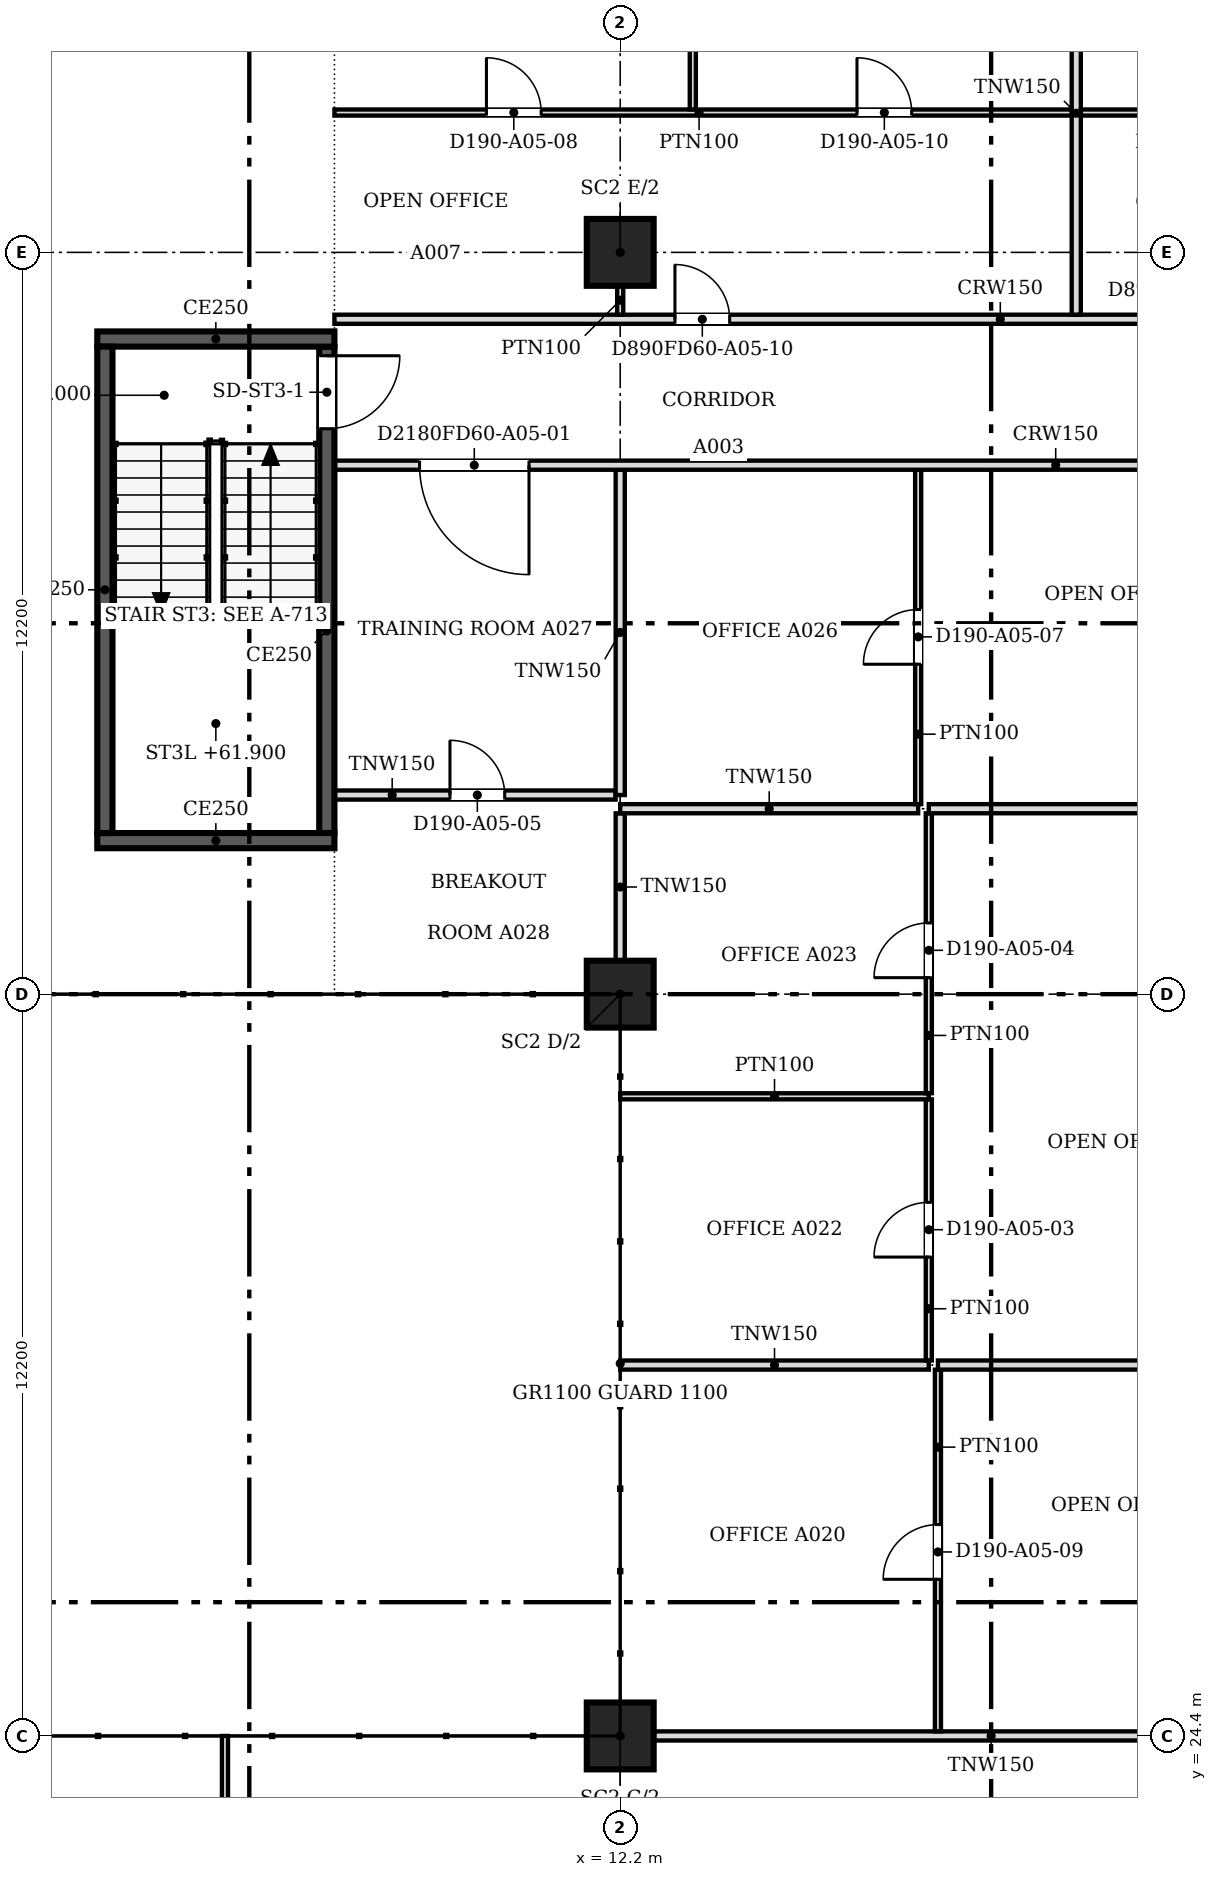
"""IFC4 building model, lengths in metres.
Left out: names, types, materials, properties, quantities, classifications, styles, units other than length and angle.
Written with IfcOpenShell. Run it as: python <this file> out.ifc"""

import sys

from ifc_helpers import new_model, si_unit, direction, frame, frame_2d, origin, origin_2d, place, context, subcontext, project, spatial, polyline, rectangle, outline, extrude, faceted_brep, source, transform, mapped, element, fill, save


model = new_model("IFC4")
c1 = context("Model", 3, precision=1e-05, world=origin(), true_north=direction((0.0, 1.0)))
c2 = subcontext(c1, "Body", "Model", "MODEL_VIEW")
j1 = project(units=[si_unit("LENGTHUNIT", "METRE"), si_unit("PLANEANGLEUNIT", "RADIAN")], contexts=[c1])
p1 = place(None, origin())
s1 = spatial("IfcSite", under=j1, at=p1, CompositionType="ELEMENT")
p2 = place(p1, origin())
s2 = spatial("IfcBuilding", under=s1, at=p2, CompositionType="ELEMENT")
p3 = place(p2, frame((0.0, 0.0, 60.0)))
s3 = spatial("IfcBuildingStorey", under=s2, at=p3, CompositionType="ELEMENT", Elevation=60.0)
for number, where, z_axis, x_axis in (
    (1, (12.2, 24.4, 0.0), (0.0, 0.0, 1.0), (1.0, 0.0, 0.0)),
    (2, (12.2, 36.6, 0.0), (0.0, 0.0, 1.0), (1.0, 0.0, 0.0)),
    (3, (12.2, 48.8, 0.0), (0.0, 0.0, 1.0), (1.0, 0.0, 0.0)),
):
    element("IfcColumn", number, at=place(p3, frame(where, z_axis=z_axis, x_axis=x_axis)), inside=s3, PredefinedType="COLUMN", context=c2, shape_type="SweptSolid", body=[
        extrude(rectangle(XDim=1.1, YDim=1.1, at=origin_2d()), origin(), (0.0, 0.0, 1.0), 3.5),
    ])
m1 = source(origin(), c2, "Body", "Brep", [
    faceted_brep([(0.053, -0.25, 0.0), (2.997, -0.25, 3.8), (0.053, -0.25, 7.6), (0.0, -0.25, 7.532), (0.0, -0.25, 0.068), (0.106, 0.25, 7.532), (2.944, 0.25, 3.868), (2.944, 0.25, 3.732), (0.106, 0.25, 0.068), (2.997, 0.0, 3.8), (0.053, 0.0, 0.0), (0.053, 0.0, 7.6)], [[[0, 1, 2, 3, 4]], [[5, 6, 7, 8]], [[8, 7, 9, 1, 0, 10]], [[6, 5, 11, 2, 1, 9]], [[3, 2, 11]], [[10, 0, 4]], [[8, 10, 4, 3, 11, 5]], [[9, 7, 6]]]),
])
p4 = place(p3, frame((3.431, 53.625, -3.8), z_axis=(0.0, 0.0, 1.0), x_axis=(-0.707106781187, -0.707106781187, 0.0)))
e4 = element("IfcWall", 4, at=p4, inside=s3, PredefinedType="SOLIDWALL", context=c2, shape_type="MappedRepresentation", body=[
    mapped(m1, transform((0.0, 0.0, 0.0), scale=1.0)),
])
m2 = source(origin(), c2, "Body", "SweptSolid", [
    extrude(outline(polyline([(0.253, 0.666), (2.681, 3.8), (0.253, 6.934), (0.253, 0.666)])), frame((0.0, 0.26, 0.0), z_axis=(0.0, -1.0, 0.0), x_axis=(1.0, 0.0, 0.0)), (0.0, 0.0, 1.0), 0.52),
])
p5 = place(p4, origin())
e5 = element("IfcOpeningElement", 5, at=p5, cuts=e4, PredefinedType="OPENING", context=c2, shape_type="MappedRepresentation", body=[
    mapped(m2, transform((0.0, 0.0, 0.0), scale=1.0)),
])
m3 = source(origin(), c2, "Body", "Brep", [
    faceted_brep([(2.944, -0.25, 0.0), (2.997, -0.25, 0.068), (2.997, -0.25, 3.8), (0.0, -0.25, 3.8), (0.053, 0.25, 3.8), (2.891, 0.25, 3.8), (2.891, 0.25, 0.068), (0.053, 0.25, 3.732), (2.944, 0.0, 0.0), (0.0, 0.0, 3.8)], [[[0, 1, 2, 3]], [[4, 5, 6, 7]], [[1, 0, 8]], [[5, 4, 9, 3, 2]], [[7, 6, 8, 0, 3, 9]], [[7, 9, 4]], [[1, 8, 6, 5, 2]]]),
])
p6 = place(p3, frame((3.394, 53.588, 0.0), z_axis=(0.0, 0.0, 1.0), x_axis=(-0.707106781187, -0.707106781187, 0.0)))
e6 = element("IfcWall", 6, at=p6, inside=s3, PredefinedType="SOLIDWALL", context=c2, shape_type="MappedRepresentation", body=[
    mapped(m3, transform((0.0, 0.0, 0.0), scale=1.0)),
])
m4 = source(origin(), c2, "Body", "SweptSolid", [
    extrude(outline(polyline([(2.744, 3.55), (0.51, 3.55), (2.744, 0.666), (2.744, 3.55)])), frame((0.0, 0.26, 0.0), z_axis=(0.0, -1.0, 0.0), x_axis=(1.0, 0.0, 0.0)), (0.0, 0.0, 1.0), 0.52),
])
p7 = place(p6, origin())
e7 = element("IfcOpeningElement", 7, at=p7, cuts=e6, PredefinedType="OPENING", context=c2, shape_type="MappedRepresentation", body=[
    mapped(m4, transform((0.0, 0.0, 0.0), scale=1.0)),
])
p8 = place(p3, frame((7.5, 39.125, 0.0), z_axis=(0.0, 0.0, 1.0), x_axis=(-1.0, 0.0, 0.0)))
e8 = element("IfcWall", 8, at=p8, inside=s3, PredefinedType="SOLIDWALL", context=c2, shape_type="SweptSolid", body=[
    extrude(rectangle(XDim=3.9, YDim=0.25, at=frame_2d((1.95, 0.0))), origin(), (0.0, 0.0, 1.0), 3.8),
])
p9 = place(p3, frame((3.725, 39.25, 0.0), z_axis=(0.0, 0.0, 1.0), x_axis=(0.0, 1.0, 0.0)))
e9 = element("IfcWall", 9, at=p9, inside=s3, PredefinedType="SOLIDWALL", context=c2, shape_type="SweptSolid", body=[
    extrude(rectangle(XDim=8.0, YDim=0.25, at=frame_2d((4.0, 0.0))), origin(), (0.0, 0.0, 1.0), 3.8),
])
p10 = place(p3, frame((3.6, 47.375, 0.0), z_axis=(0.0, 0.0, 1.0), x_axis=(1.0, 0.0, 0.0)))
e10 = element("IfcWall", 10, at=p10, inside=s3, PredefinedType="SOLIDWALL", context=c2, shape_type="SweptSolid", body=[
    extrude(rectangle(XDim=3.9, YDim=0.25, at=frame_2d((1.95, 0.0))), origin(), (0.0, 0.0, 1.0), 3.8),
])
p11 = place(p3, frame((7.375, 47.25, 0.0), z_axis=(0.0, 0.0, 1.0), x_axis=(0.0, -1.0, 0.0)))
e11 = element("IfcWall", 11, at=p11, inside=s3, PredefinedType="SOLIDWALL", context=c2, shape_type="SweptSolid", body=[
    extrude(rectangle(XDim=8.0, YDim=0.25, at=frame_2d((4.0, 0.0))), origin(), (0.0, 0.0, 1.0), 3.8),
])
m5 = source(origin(), c2, "Body", "SweptSolid", [
    extrude(rectangle(XDim=1.2, YDim=2.1, at=frame_2d((0.6, 1.05))), frame((0.0, 0.135, 0.0), z_axis=(0.0, -1.0, 0.0), x_axis=(1.0, 0.0, 0.0)), (0.0, 0.0, 1.0), 0.27),
])
p12 = place(p11, frame((0.15, 0.0, 0.0)))
e12 = element("IfcOpeningElement", 12, at=p12, cuts=e11, PredefinedType="OPENING", context=c2, shape_type="MappedRepresentation", body=[
    mapped(m5, transform((0.0, 0.0, 0.0), scale=1.0)),
])
p13 = place(p3, frame((5.7, 18.99, 0.0), z_axis=(0.0, 0.0, 1.0), x_axis=(0.0, 1.0, 0.0)))
e13 = element("IfcWall", 13, at=p13, inside=s3, PredefinedType="PARTITIONING", context=c2, shape_type="SweptSolid", body=[
    extrude(rectangle(XDim=5.41, YDim=0.1, at=frame_2d((2.705, 0.0))), origin(), (0.0, 0.0, 1.0), 2.888),
])
m6 = source(origin(), c2, "Body", "SweptSolid", [
    extrude(rectangle(XDim=0.9, YDim=2.1, at=frame_2d((0.45, 1.05))), frame((0.0, 0.06, 0.0), z_axis=(0.0, -1.0, 0.0), x_axis=(1.0, 0.0, 0.0)), (0.0, 0.0, 1.0), 0.12),
])
p14 = place(p13, frame((2.3, 0.0, 0.0)))
e14 = element("IfcOpeningElement", 14, at=p14, cuts=e13, PredefinedType="OPENING", context=c2, shape_type="MappedRepresentation", body=[
    mapped(m6, transform((0.0, 0.0, 0.0), scale=1.0)),
])
p15 = place(p3, frame((12.751, 24.4, 0.0), z_axis=(0.0, 0.0, 1.0), x_axis=(1.0, 0.0, 0.0)))
e15 = element("IfcWall", 15, at=p15, inside=s3, PredefinedType="PARTITIONING", context=c2, shape_type="SweptSolid", body=[
    extrude(rectangle(XDim=11.098, YDim=0.15, at=frame_2d((5.549, 0.0))), origin(), (0.0, 0.0, 1.0), 2.888),
])
p16 = place(p3, frame((17.425, 24.476, 0.0), z_axis=(0.0, 0.0, 1.0), x_axis=(0.0, 1.0, 0.0)))
e16 = element("IfcWall", 16, at=p16, inside=s3, PredefinedType="PARTITIONING", context=c2, shape_type="SweptSolid", body=[
    extrude(rectangle(XDim=5.948, YDim=0.1, at=frame_2d((2.974, 0.0))), origin(), (0.0, 0.0, 1.0), 2.888),
])
p17 = place(p16, frame((2.5, 0.0, 0.0)))
e17 = element("IfcOpeningElement", 17, at=p17, cuts=e16, PredefinedType="OPENING", context=c2, shape_type="MappedRepresentation", body=[
    mapped(m6, transform((0.0, 0.0, 0.0), scale=1.0)),
])
p18 = place(p3, frame((12.2, 30.5, 0.0), z_axis=(0.0, 0.0, 1.0), x_axis=(1.0, 0.0, 0.0)))
e18 = element("IfcWall", 18, at=p18, inside=s3, PredefinedType="PARTITIONING", context=c2, shape_type="SweptSolid", body=[
    extrude(rectangle(XDim=5.075, YDim=0.15, at=frame_2d((2.538, 0.0))), origin(), (0.0, 0.0, 1.0), 2.888),
])
p19 = place(p3, frame((17.425, 30.5, 0.0), z_axis=(0.0, 0.0, 1.0), x_axis=(1.0, 0.0, 0.0)))
e19 = element("IfcWall", 19, at=p19, inside=s3, PredefinedType="PARTITIONING", context=c2, shape_type="SweptSolid", body=[
    extrude(rectangle(XDim=10.599, YDim=0.15, at=frame_2d((5.299, 0.0))), origin(), (0.0, 0.0, 1.0), 2.888),
])
p20 = place(p3, frame((17.275, 30.576, 0.0), z_axis=(0.0, 0.0, 1.0), x_axis=(0.0, 1.0, 0.0)))
e20 = element("IfcWall", 20, at=p20, inside=s3, PredefinedType="PARTITIONING", context=c2, shape_type="SweptSolid", body=[
    extrude(rectangle(XDim=4.293, YDim=0.1, at=frame_2d((2.147, 0.0))), origin(), (0.0, 0.0, 1.0), 2.888),
])
p21 = place(p20, frame((1.7, 0.0, 0.0)))
e21 = element("IfcOpeningElement", 21, at=p21, cuts=e20, PredefinedType="OPENING", context=c2, shape_type="MappedRepresentation", body=[
    mapped(m6, transform((0.0, 0.0, 0.0), scale=1.0)),
])
p22 = place(p3, frame((12.2, 34.92, 0.0), z_axis=(0.0, 0.0, 1.0), x_axis=(1.0, 0.0, 0.0)))
e22 = element("IfcWall", 22, at=p22, inside=s3, PredefinedType="PARTITIONING", context=c2, shape_type="SweptSolid", body=[
    extrude(rectangle(XDim=5.075, YDim=0.1, at=frame_2d((2.538, 0.0))), origin(), (0.0, 0.0, 1.0), 2.888),
])
p23 = place(p3, frame((17.275, 34.971, 0.0), z_axis=(0.0, 0.0, 1.0), x_axis=(0.0, 1.0, 0.0)))
e23 = element("IfcWall", 23, at=p23, inside=s3, PredefinedType="PARTITIONING", context=c2, shape_type="SweptSolid", body=[
    extrude(rectangle(XDim=4.603, YDim=0.1, at=frame_2d((2.301, 0.0))), origin(), (0.0, 0.0, 1.0), 2.888),
])
p24 = place(p23, frame((1.9, 0.0, 0.0)))
e24 = element("IfcOpeningElement", 24, at=p24, cuts=e23, PredefinedType="OPENING", context=c2, shape_type="MappedRepresentation", body=[
    mapped(m6, transform((0.0, 0.0, 0.0), scale=1.0)),
])
p25 = place(p3, frame((12.2, 37.151, 0.0), z_axis=(0.0, 0.0, 1.0), x_axis=(0.0, 1.0, 0.0)))
e25 = element("IfcWall", 25, at=p25, inside=s3, PredefinedType="PARTITIONING", context=c2, shape_type="SweptSolid", body=[
    extrude(rectangle(XDim=2.423, YDim=0.15, at=frame_2d((1.211, 0.0))), origin(), (0.0, 0.0, 1.0), 2.888),
])
p26 = place(p3, frame((12.2, 39.65, 0.0), z_axis=(0.0, 0.0, 1.0), x_axis=(1.0, 0.0, 0.0)))
e26 = element("IfcWall", 26, at=p26, inside=s3, PredefinedType="PARTITIONING", context=c2, shape_type="SweptSolid", body=[
    extrude(rectangle(XDim=4.9, YDim=0.15, at=frame_2d((2.45, 0.0))), origin(), (0.0, 0.0, 1.0), 2.888),
])
p27 = place(p3, frame((17.275, 39.65, 0.0), z_axis=(0.0, 0.0, 1.0), x_axis=(1.0, 0.0, 0.0)))
e27 = element("IfcWall", 27, at=p27, inside=s3, PredefinedType="PARTITIONING", context=c2, shape_type="SweptSolid", body=[
    extrude(rectangle(XDim=10.749, YDim=0.15, at=frame_2d((5.375, 0.0))), origin(), (0.0, 0.0, 1.0), 2.888),
])
p28 = place(p3, frame((17.1, 39.726, 0.0), z_axis=(0.0, 0.0, 1.0), x_axis=(0.0, 1.0, 0.0)))
e28 = element("IfcWall", 28, at=p28, inside=s3, PredefinedType="PARTITIONING", context=c2, shape_type="SweptSolid", body=[
    extrude(rectangle(XDim=5.498, YDim=0.1, at=frame_2d((2.749, 0.0))), origin(), (0.0, 0.0, 1.0), 2.888),
])
p29 = place(p28, frame((2.3, 0.0, 0.0)))
e29 = element("IfcOpeningElement", 29, at=p29, cuts=e28, PredefinedType="OPENING", context=c2, shape_type="MappedRepresentation", body=[
    mapped(m6, transform((0.0, 0.0, 0.0), scale=1.0)),
])
p30 = place(p3, frame((12.124, 39.875, 0.0), z_axis=(0.0, 0.0, 1.0), x_axis=(-1.0, 0.0, 0.0)))
e30 = element("IfcWall", 30, at=p30, inside=s3, PredefinedType="PARTITIONING", context=c2, shape_type="SweptSolid", body=[
    extrude(rectangle(XDim=4.624, YDim=0.15, at=frame_2d((2.312, 0.0))), origin(), (0.0, 0.0, 1.0), 2.888),
])
m7 = source(origin(), c2, "Body", "SweptSolid", [
    extrude(rectangle(XDim=0.9, YDim=2.1, at=frame_2d((0.45, 1.05))), frame((0.0, 0.085, 0.0), z_axis=(0.0, -1.0, 0.0), x_axis=(1.0, 0.0, 0.0)), (0.0, 0.0, 1.0), 0.17),
])
p31 = place(p30, frame((1.824, 0.0, 0.0)))
e31 = element("IfcOpeningElement", 31, at=p31, cuts=e30, PredefinedType="OPENING", context=c2, shape_type="MappedRepresentation", body=[
    mapped(m7, transform((0.0, 0.0, 0.0), scale=1.0)),
])
p32 = place(p3, frame((12.2, 39.875, 0.0), z_axis=(0.0, 0.0, 1.0), x_axis=(0.0, 1.0, 0.0)))
e32 = element("IfcWall", 32, at=p32, inside=s3, PredefinedType="PARTITIONING", context=c2, shape_type="SweptSolid", body=[
    extrude(rectangle(XDim=5.349, YDim=0.15, at=frame_2d((2.675, 0.0))), origin(), (0.0, 0.0, 1.0), 2.888),
])
p33 = place(p3, frame((28.024, 45.3, 0.0), z_axis=(0.0, 0.0, 1.0), x_axis=(-1.0, 0.0, 0.0)))
e33 = element("IfcWall", 33, at=p33, inside=s3, PredefinedType="PARTITIONING", context=c2, shape_type="SweptSolid", body=[
    extrude(rectangle(XDim=20.524, YDim=0.15, at=frame_2d((10.262, 0.0))), origin(), (0.0, 0.0, 1.0), 2.888),
])
m8 = source(origin(), c2, "Body", "SweptSolid", [
    extrude(rectangle(XDim=1.8, YDim=2.1, at=frame_2d((0.9, 1.05))), frame((0.0, 0.085, 0.0), z_axis=(0.0, -1.0, 0.0), x_axis=(1.0, 0.0, 0.0)), (0.0, 0.0, 1.0), 0.17),
])
p34 = place(p33, frame((17.324, 0.0, 0.0)))
e34 = element("IfcOpeningElement", 34, at=p34, cuts=e33, PredefinedType="OPENING", context=c2, shape_type="MappedRepresentation", body=[
    mapped(m8, transform((0.0, 0.0, 0.0), scale=1.0)),
])
p35 = place(p3, frame((7.5, 47.7, 0.0), z_axis=(0.0, 0.0, 1.0), x_axis=(1.0, 0.0, 0.0)))
e35 = element("IfcWall", 35, at=p35, inside=s3, PredefinedType="PARTITIONING", context=c2, shape_type="SweptSolid", body=[
    extrude(rectangle(XDim=20.6, YDim=0.15, at=frame_2d((10.3, 0.0))), origin(), (0.0, 0.0, 1.0), 2.888),
])
p36 = place(p35, frame((15.401, 0.0, 0.0)))
e36 = element("IfcOpeningElement", 36, at=p36, cuts=e35, PredefinedType="OPENING", context=c2, shape_type="MappedRepresentation", body=[
    mapped(m7, transform((0.0, 0.0, 0.0), scale=1.0)),
])
p37 = place(p35, frame((5.6, 0.0, 0.0)))
e37 = element("IfcOpeningElement", 37, at=p37, cuts=e35, PredefinedType="OPENING", context=c2, shape_type="MappedRepresentation", body=[
    mapped(m7, transform((0.0, 0.0, 0.0), scale=1.0)),
])
p38 = place(p3, frame((19.7, 47.776, 0.0), z_axis=(0.0, 0.0, 1.0), x_axis=(0.0, 1.0, 0.0)))
e38 = element("IfcWall", 38, at=p38, inside=s3, PredefinedType="PARTITIONING", context=c2, shape_type="SweptSolid", body=[
    extrude(rectangle(XDim=6.624, YDim=0.15, at=frame_2d((3.312, 0.0))), origin(), (0.0, 0.0, 1.0), 2.888),
])
p39 = place(p3, frame((12.2, 48.25, 0.0), z_axis=(0.0, 0.0, 1.0), x_axis=(0.0, -1.0, 0.0)))
e39 = element("IfcWall", 39, at=p39, inside=s3, PredefinedType="PARTITIONING", context=c2, shape_type="SweptSolid", body=[
    extrude(rectangle(XDim=0.475, YDim=0.1, at=frame_2d((0.238, 0.0))), origin(), (0.0, 0.0, 1.0), 2.888),
])
p40 = place(p3, frame((7.5, 51.1, 0.0), z_axis=(0.0, 0.0, 1.0), x_axis=(1.0, 0.0, 0.0)))
e40 = element("IfcWall", 40, at=p40, inside=s3, PredefinedType="PARTITIONING", context=c2, shape_type="SweptSolid", body=[
    extrude(rectangle(XDim=12.124, YDim=0.1, at=frame_2d((6.062, 0.0))), origin(), (0.0, 0.0, 1.0), 2.888),
])
p41 = place(p40, frame((2.5, 0.0, 0.0)))
e41 = element("IfcOpeningElement", 41, at=p41, cuts=e40, PredefinedType="OPENING", context=c2, shape_type="MappedRepresentation", body=[
    mapped(m6, transform((0.0, 0.0, 0.0), scale=1.0)),
])
p42 = place(p40, frame((8.594, 0.0, 0.0)))
e42 = element("IfcOpeningElement", 42, at=p42, cuts=e40, PredefinedType="OPENING", context=c2, shape_type="MappedRepresentation", body=[
    mapped(m6, transform((0.0, 0.0, 0.0), scale=1.0)),
])
p43 = place(p3, frame((19.776, 51.1, 0.0), z_axis=(0.0, 0.0, 1.0), x_axis=(1.0, 0.0, 0.0)))
e43 = element("IfcWall", 43, at=p43, inside=s3, PredefinedType="PARTITIONING", context=c2, shape_type="SweptSolid", body=[
    extrude(rectangle(XDim=8.248, YDim=0.1, at=frame_2d((4.124, 0.0))), origin(), (0.0, 0.0, 1.0), 2.888),
])
p44 = place(p43, frame((1.5, 0.0, 0.0)))
e44 = element("IfcOpeningElement", 44, at=p44, cuts=e43, PredefinedType="OPENING", context=c2, shape_type="MappedRepresentation", body=[
    mapped(m6, transform((0.0, 0.0, 0.0), scale=1.0)),
])
p45 = place(p43, frame((5.682, 0.0, 0.0)))
e45 = element("IfcOpeningElement", 45, at=p45, cuts=e43, PredefinedType="OPENING", context=c2, shape_type="MappedRepresentation", body=[
    mapped(m6, transform((0.0, 0.0, 0.0), scale=1.0)),
])
p46 = place(p3, frame((13.394, 51.151, 0.0), z_axis=(0.0, 0.0, 1.0), x_axis=(0.0, 1.0, 0.0)))
e46 = element("IfcWall", 46, at=p46, inside=s3, PredefinedType="PARTITIONING", context=c2, shape_type="SweptSolid", body=[
    extrude(rectangle(XDim=3.249, YDim=0.1, at=frame_2d((1.625, 0.0))), origin(), (0.0, 0.0, 1.0), 2.888),
])
m9 = source(origin(), c2, "Body", "SweptSolid", [
    extrude(rectangle(XDim=1.2, YDim=2.1, at=frame_2d((0.6, 1.05))), frame((0.0, 0.025, 0.0), z_axis=(0.0, -1.0, 0.0), x_axis=(1.0, 0.0, 0.0)), (0.0, 0.0, 1.0), 0.05),
])
p47 = place(p12, origin())
e47 = element("IfcDoor", 47, at=p47, inside=s3, OperationType="SINGLE_SWING_LEFT", PredefinedType="DOOR", context=c2, shape_type="MappedRepresentation", body=[
    mapped(m9, transform((0.0, 0.0, 0.0), scale=1.0)),
])
fill(e12, e47)
m10 = source(origin(), c2, "Body", "SweptSolid", [
    extrude(rectangle(XDim=0.9, YDim=2.1, at=frame_2d((0.45, 1.05))), frame((0.0, 0.025, 0.0), z_axis=(0.0, -1.0, 0.0), x_axis=(1.0, 0.0, 0.0)), (0.0, 0.0, 1.0), 0.05),
])
p48 = place(p21, origin())
e48 = element("IfcDoor", 48, at=p48, inside=s3, OperationType="SINGLE_SWING_LEFT", PredefinedType="DOOR", context=c2, shape_type="MappedRepresentation", body=[
    mapped(m10, transform((0.0, 0.0, 0.0), scale=1.0)),
])
fill(e21, e48)
p49 = place(p24, origin())
e49 = element("IfcDoor", 49, at=p49, inside=s3, OperationType="SINGLE_SWING_LEFT", PredefinedType="DOOR", context=c2, shape_type="MappedRepresentation", body=[
    mapped(m10, transform((0.0, 0.0, 0.0), scale=1.0)),
])
fill(e24, e49)
p50 = place(p31, origin())
e50 = element("IfcDoor", 50, at=p50, inside=s3, OperationType="SINGLE_SWING_RIGHT", PredefinedType="DOOR", context=c2, shape_type="MappedRepresentation", body=[
    mapped(m10, transform((0.0, 0.0, 0.0), scale=1.0)),
])
fill(e31, e50)
m11 = source(origin(), c2, "Body", "SweptSolid", [
    extrude(rectangle(XDim=1.8, YDim=2.1, at=frame_2d((0.9, 1.05))), frame((0.0, 0.025, 0.0), z_axis=(0.0, -1.0, 0.0), x_axis=(1.0, 0.0, 0.0)), (0.0, 0.0, 1.0), 0.05),
])
p51 = place(p34, origin())
e51 = element("IfcDoor", 51, at=p51, inside=s3, OperationType="DOUBLE_DOOR_SINGLE_SWING", PredefinedType="DOOR", context=c2, shape_type="MappedRepresentation", body=[
    mapped(m11, transform((0.0, 0.0, 0.0), scale=1.0)),
])
fill(e34, e51)
p52 = place(p29, origin())
e52 = element("IfcDoor", 52, at=p52, inside=s3, OperationType="SINGLE_SWING_LEFT", PredefinedType="DOOR", context=c2, shape_type="MappedRepresentation", body=[
    mapped(m10, transform((0.0, 0.0, 0.0), scale=1.0)),
])
fill(e29, e52)
p53 = place(p41, origin())
e53 = element("IfcDoor", 53, at=p53, inside=s3, OperationType="SINGLE_SWING_LEFT", PredefinedType="DOOR", context=c2, shape_type="MappedRepresentation", body=[
    mapped(m10, transform((0.0, 0.0, 0.0), scale=1.0)),
])
fill(e41, e53)
p54 = place(p17, origin())
e54 = element("IfcDoor", 54, at=p54, inside=s3, OperationType="SINGLE_SWING_LEFT", PredefinedType="DOOR", context=c2, shape_type="MappedRepresentation", body=[
    mapped(m10, transform((0.0, 0.0, 0.0), scale=1.0)),
])
fill(e17, e54)
p55 = place(p42, origin())
e55 = element("IfcDoor", 55, at=p55, inside=s3, OperationType="SINGLE_SWING_LEFT", PredefinedType="DOOR", context=c2, shape_type="MappedRepresentation", body=[
    mapped(m10, transform((0.0, 0.0, 0.0), scale=1.0)),
])
fill(e42, e55)
p56 = place(p37, origin())
e56 = element("IfcDoor", 56, at=p56, inside=s3, OperationType="SINGLE_SWING_LEFT", PredefinedType="DOOR", context=c2, shape_type="MappedRepresentation", body=[
    mapped(m10, transform((0.0, 0.0, 0.0), scale=1.0)),
])
fill(e37, e56)
save(model, sys.argv[1])
